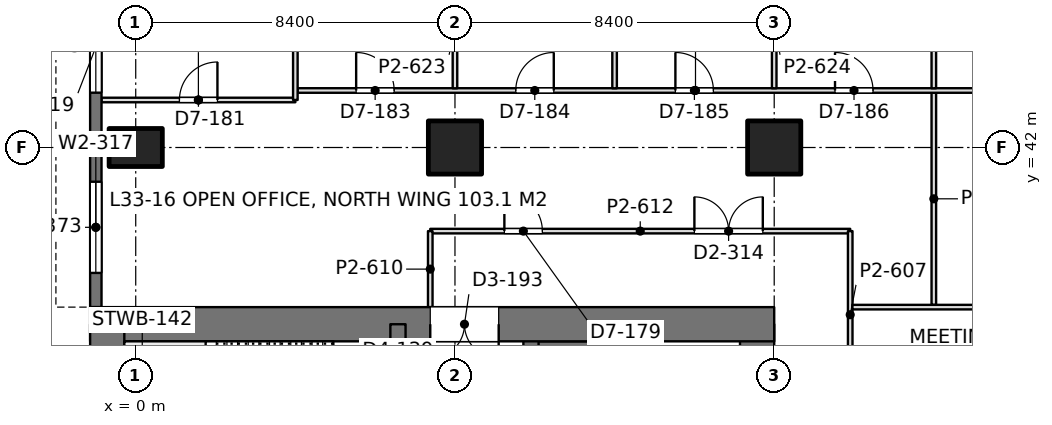
"""IFC4 building model, lengths in metres.
Left out: names, types, materials, properties, quantities, classifications, styles, units other than length and angle.
Written with IfcOpenShell. Run it as: python <this file> out.ifc"""

import sys

from ifc_helpers import new_model, si_unit, direction, frame, frame_2d, origin, origin_2d, place, context, subcontext, project, spatial, rectangle, extrude, element, fill, save


model = new_model("IFC4")
c1 = context("Model", 3, precision=1e-05, world=origin(), true_north=direction((0.0, 1.0)))
c2 = subcontext(c1, "Body", "Model", "MODEL_VIEW")
j1 = project(units=[si_unit("LENGTHUNIT", "METRE"), si_unit("PLANEANGLEUNIT", "RADIAN")], contexts=[c1])
p1 = place(None, origin())
s1 = spatial("IfcSite", under=j1, at=p1, CompositionType="ELEMENT")
p2 = place(p1, origin())
s2 = spatial("IfcBuilding", under=s1, at=p2, CompositionType="ELEMENT")
p3 = place(p2, frame((0.0, 0.0, 147.0)))
s3 = spatial("IfcBuildingStorey", under=s2, at=p3, CompositionType="ELEMENT", Elevation=147.0)
p4 = place(p3, frame((0.0, 42.0, 0.0), z_axis=(0.0, 0.0, 1.0), x_axis=(0.0, 1.0, 0.0)))
e1 = element("IfcColumn", 1, at=p4, inside=s3, PredefinedType="COLUMN", context=c2, shape_type="SweptSolid", body=[
    extrude(rectangle(XDim=1.0, YDim=1.4, at=origin_2d()), origin(), (0.0, 0.0, 1.0), 4.2),
])
for number, where, z_axis, x_axis in (
    (2, (8.4, 42.0, 0.0), (0.0, 0.0, 1.0), (1.0, 0.0, 0.0)),
    (3, (16.8, 42.0, 0.0), (0.0, 0.0, 1.0), (1.0, 0.0, 0.0)),
):
    element("IfcColumn", number, at=place(p3, frame(where, z_axis=z_axis, x_axis=x_axis)), inside=s3, PredefinedType="COLUMN", context=c2, shape_type="SweptSolid", body=[
        extrude(rectangle(XDim=1.4, YDim=1.4, at=origin_2d()), origin(), (0.0, 0.0, 1.0), 4.2),
    ])
p5 = place(p3, frame((-1.2, 37.35, 0.0), z_axis=(0.0, 0.0, 1.0), x_axis=(1.0, 0.0, 0.0)))
e4 = element("IfcWall", 4, at=p5, inside=s3, PredefinedType="SHEAR", context=c2, shape_type="SweptSolid", body=[
    extrude(rectangle(XDim=18.0, YDim=0.9, at=frame_2d((9.0, 0.0))), origin(), (0.0, 0.0, 1.0), 4.2),
])
p6 = place(p5, frame((8.95, 0.0, 0.0)))
e5 = element("IfcOpeningElement", 5, at=p6, cuts=e4, PredefinedType="OPENING", context=c2, shape_type="SweptSolid", body=[
    extrude(rectangle(XDim=1.8, YDim=2.4, at=frame_2d((0.9, 1.2))), frame((0.0, 0.46, 0.0), z_axis=(0.0, -1.0, 0.0), x_axis=(1.0, 0.0, 0.0)), (0.0, 0.0, 1.0), 0.92),
])
p7 = place(p3, frame((-0.75, 13.05, 0.0), z_axis=(0.0, 0.0, 1.0), x_axis=(0.0, 1.0, 0.0)))
e6 = element("IfcWall", 6, at=p7, inside=s3, PredefinedType="SHEAR", context=c2, shape_type="SweptSolid", body=[
    extrude(rectangle(XDim=24.3, YDim=0.9, at=frame_2d((12.15, 0.0))), origin(), (0.0, 0.0, 1.0), 4.2),
])
p8 = place(p3, frame((16.35, 22.1, 0.0), z_axis=(0.0, 0.0, 1.0), x_axis=(0.0, 1.0, 0.0)))
e7 = element("IfcWall", 7, at=p8, inside=s3, PredefinedType="SHEAR", context=c2, shape_type="SweptSolid", body=[
    extrude(rectangle(XDim=15.25, YDim=0.9, at=frame_2d((7.625, 0.0))), origin(), (0.0, 0.0, 1.0), 4.2),
])
p9 = place(p3, frame((6.9, 13.05, 0.0), z_axis=(0.0, 0.0, 1.0), x_axis=(0.0, 1.0, 0.0)))
e8 = element("IfcWall", 8, at=p9, inside=s3, PredefinedType="SHEAR", context=c2, shape_type="SweptSolid", body=[
    extrude(rectangle(XDim=24.3, YDim=0.4, at=frame_2d((12.15, 0.0))), origin(), (0.0, 0.0, 1.0), 4.2),
])
p10 = place(p9, frame((1.3, 0.0, 0.0)))
e9 = element("IfcOpeningElement", 9, at=p10, cuts=e8, PredefinedType="OPENING", context=c2, shape_type="SweptSolid", body=[
    extrude(rectangle(XDim=1.0, YDim=2.2, at=frame_2d((0.5, 1.1))), frame((0.0, 0.21, 0.0), z_axis=(0.0, -1.0, 0.0), x_axis=(1.0, 0.0, 0.0)), (0.0, 0.0, 1.0), 0.42),
])
p11 = place(p9, frame((22.0, 0.0, 0.0)))
e10 = element("IfcOpeningElement", 10, at=p11, cuts=e8, PredefinedType="OPENING", context=c2, shape_type="SweptSolid", body=[
    extrude(rectangle(XDim=1.0, YDim=2.2, at=frame_2d((0.5, 1.1))), frame((0.0, 0.21, 0.0), z_axis=(0.0, -1.0, 0.0), x_axis=(1.0, 0.0, 0.0)), (0.0, 0.0, 1.0), 0.42),
])
p12 = place(p9, frame((5.55, 0.0, 0.0)))
e11 = element("IfcOpeningElement", 11, at=p12, cuts=e8, PredefinedType="OPENING", context=c2, shape_type="SweptSolid", body=[
    extrude(rectangle(XDim=1.0, YDim=2.2, at=frame_2d((0.5, 1.1))), frame((0.0, 0.21, 0.0), z_axis=(0.0, -1.0, 0.0), x_axis=(1.0, 0.0, 0.0)), (0.0, 0.0, 1.0), 0.42),
])
p13 = place(p9, frame((9.55, 0.0, 0.0)))
e12 = element("IfcOpeningElement", 12, at=p13, cuts=e8, PredefinedType="OPENING", context=c2, shape_type="SweptSolid", body=[
    extrude(rectangle(XDim=1.0, YDim=2.2, at=frame_2d((0.5, 1.1))), frame((0.0, 0.21, 0.0), z_axis=(0.0, -1.0, 0.0), x_axis=(1.0, 0.0, 0.0)), (0.0, 0.0, 1.0), 0.42),
])
p14 = place(p9, frame((12.8, 0.0, 0.0)))
e13 = element("IfcOpeningElement", 13, at=p14, cuts=e8, PredefinedType="OPENING", context=c2, shape_type="SweptSolid", body=[
    extrude(rectangle(XDim=1.1, YDim=2.2, at=frame_2d((0.55, 1.1))), frame((0.0, 0.21, 0.0), z_axis=(0.0, -1.0, 0.0), x_axis=(1.0, 0.0, 0.0)), (0.0, 0.0, 1.0), 0.42),
])
p15 = place(p9, frame((15.538, 0.0, 0.0)))
e14 = element("IfcOpeningElement", 14, at=p15, cuts=e8, PredefinedType="OPENING", context=c2, shape_type="SweptSolid", body=[
    extrude(rectangle(XDim=1.1, YDim=2.2, at=frame_2d((0.55, 1.1))), frame((0.0, 0.21, 0.0), z_axis=(0.0, -1.0, 0.0), x_axis=(1.0, 0.0, 0.0)), (0.0, 0.0, 1.0), 0.42),
])
p16 = place(p9, frame((18.262, 0.0, 0.0)))
e15 = element("IfcOpeningElement", 15, at=p16, cuts=e8, PredefinedType="OPENING", context=c2, shape_type="SweptSolid", body=[
    extrude(rectangle(XDim=1.1, YDim=2.2, at=frame_2d((0.55, 1.1))), frame((0.0, 0.21, 0.0), z_axis=(0.0, -1.0, 0.0), x_axis=(1.0, 0.0, 0.0)), (0.0, 0.0, 1.0), 0.42),
])
p17 = place(p3, frame((10.4, 13.05, 0.0), z_axis=(0.0, 0.0, 1.0), x_axis=(0.0, 1.0, 0.0)))
e16 = element("IfcWall", 16, at=p17, inside=s3, PredefinedType="SHEAR", context=c2, shape_type="SweptSolid", body=[
    extrude(rectangle(XDim=24.3, YDim=0.4, at=frame_2d((12.15, 0.0))), origin(), (0.0, 0.0, 1.0), 4.2),
])
p18 = place(p17, frame((10.05, 0.0, 0.0)))
e17 = element("IfcOpeningElement", 17, at=p18, cuts=e16, PredefinedType="OPENING", context=c2, shape_type="SweptSolid", body=[
    extrude(rectangle(XDim=1.1, YDim=2.2, at=frame_2d((0.55, 1.1))), frame((0.0, 0.21, 0.0), z_axis=(0.0, -1.0, 0.0), x_axis=(1.0, 0.0, 0.0)), (0.0, 0.0, 1.0), 0.42),
])
p19 = place(p17, frame((12.9, 0.0, 0.0)))
e18 = element("IfcOpeningElement", 18, at=p19, cuts=e16, PredefinedType="OPENING", context=c2, shape_type="SweptSolid", body=[
    extrude(rectangle(XDim=1.1, YDim=2.2, at=frame_2d((0.55, 1.1))), frame((0.0, 0.21, 0.0), z_axis=(0.0, -1.0, 0.0), x_axis=(1.0, 0.0, 0.0)), (0.0, 0.0, 1.0), 0.42),
])
p20 = place(p17, frame((21.45, 0.0, 0.0)))
e19 = element("IfcOpeningElement", 19, at=p20, cuts=e16, PredefinedType="OPENING", context=c2, shape_type="SweptSolid", body=[
    extrude(rectangle(XDim=1.1, YDim=2.2, at=frame_2d((0.55, 1.1))), frame((0.0, 0.21, 0.0), z_axis=(0.0, -1.0, 0.0), x_axis=(1.0, 0.0, 0.0)), (0.0, 0.0, 1.0), 0.42),
])
p21 = place(p17, frame((2.25, 0.0, 0.0)))
e20 = element("IfcOpeningElement", 20, at=p21, cuts=e16, PredefinedType="OPENING", context=c2, shape_type="SweptSolid", body=[
    extrude(rectangle(XDim=1.8, YDim=2.4, at=frame_2d((0.9, 1.2))), frame((0.0, 0.21, 0.0), z_axis=(0.0, -1.0, 0.0), x_axis=(1.0, 0.0, 0.0)), (0.0, 0.0, 1.0), 0.42),
])
p22 = place(p17, frame((5.8, 0.0, 0.0)))
e21 = element("IfcOpeningElement", 21, at=p22, cuts=e16, PredefinedType="OPENING", context=c2, shape_type="SweptSolid", body=[
    extrude(rectangle(XDim=1.8, YDim=2.4, at=frame_2d((0.9, 1.2))), frame((0.0, 0.21, 0.0), z_axis=(0.0, -1.0, 0.0), x_axis=(1.0, 0.0, 0.0)), (0.0, 0.0, 1.0), 0.42),
])
p23 = place(p3, frame((13.6, 22.225, 0.0), z_axis=(0.0, 0.0, 1.0), x_axis=(0.0, 1.0, 0.0)))
e22 = element("IfcWall", 22, at=p23, inside=s3, PredefinedType="SHEAR", context=c2, shape_type="SweptSolid", body=[
    extrude(rectangle(XDim=15.125, YDim=0.4, at=frame_2d((7.562, 0.0))), origin(), (0.0, 0.0, 1.0), 4.2),
])
p24 = place(p3, frame((10.4, 36.625, 0.0), z_axis=(0.0, 0.0, 1.0), x_axis=(1.0, 0.0, 0.0)))
e23 = element("IfcWall", 23, at=p24, inside=s3, PredefinedType="SHEAR", context=c2, shape_type="SweptSolid", body=[
    extrude(rectangle(XDim=3.2, YDim=0.55, at=frame_2d((1.6, 0.0))), origin(), (0.0, 0.0, 1.0), 4.2),
])
p25 = place(p3, frame((-1.05, 37.8, 0.0), z_axis=(0.0, 0.0, 1.0), x_axis=(0.0, 1.0, 0.0)))
e24 = element("IfcWall", 24, at=p25, inside=s3, PredefinedType="SOLIDWALL", context=c2, shape_type="SweptSolid", body=[
    extrude(rectangle(XDim=4.2, YDim=0.3, at=frame_2d((2.1, 0.0))), origin(), (0.0, 0.0, 1.0), 4.05),
])
p26 = place(p25, frame((0.9, 0.0, 0.9)))
e25 = element("IfcOpeningElement", 25, at=p26, cuts=e24, PredefinedType="OPENING", context=c2, shape_type="SweptSolid", body=[
    extrude(rectangle(XDim=2.4, YDim=1.9, at=frame_2d((1.2, 0.95))), frame((0.0, 0.16, 0.0), z_axis=(0.0, -1.0, 0.0), x_axis=(1.0, 0.0, 0.0)), (0.0, 0.0, 1.0), 0.32),
])
p27 = place(p3, frame((-1.05, 42.0, 0.0), z_axis=(0.0, 0.0, 1.0), x_axis=(0.0, 1.0, 0.0)))
e26 = element("IfcWall", 26, at=p27, inside=s3, PredefinedType="SOLIDWALL", context=c2, shape_type="SweptSolid", body=[
    extrude(rectangle(XDim=5.285, YDim=0.3, at=frame_2d((2.643, 0.0))), origin(), (0.0, 0.0, 1.0), 4.05),
])
p28 = place(p27, frame((1.443, 0.0, 0.9)))
e27 = element("IfcOpeningElement", 27, at=p28, cuts=e26, PredefinedType="OPENING", context=c2, shape_type="SweptSolid", body=[
    extrude(rectangle(XDim=2.4, YDim=1.9, at=frame_2d((1.2, 0.95))), frame((0.0, 0.16, 0.0), z_axis=(0.0, -1.0, 0.0), x_axis=(1.0, 0.0, 0.0)), (0.0, 0.0, 1.0), 0.32),
])
p29 = place(p3, frame((-0.902, 43.25, 0.0), z_axis=(0.0, 0.0, 1.0), x_axis=(1.0, 0.0, 0.0)))
e28 = element("IfcWall", 28, at=p29, inside=s3, PredefinedType="PARTITIONING", context=c2, shape_type="SweptSolid", body=[
    extrude(rectangle(XDim=5.102, YDim=0.12, at=frame_2d((2.551, 0.0))), origin(), (0.0, 0.0, 1.0), 3.56),
])
p30 = place(p29, frame((2.052, 0.0, 0.0)))
e29 = element("IfcOpeningElement", 29, at=p30, cuts=e28, PredefinedType="OPENING", context=c2, shape_type="SweptSolid", body=[
    extrude(rectangle(XDim=1.0, YDim=2.4, at=frame_2d((0.5, 1.2))), frame((0.0, 0.07, 0.0), z_axis=(0.0, -1.0, 0.0), x_axis=(1.0, 0.0, 0.0)), (0.0, 0.0, 1.0), 0.14),
])
p31 = place(p3, frame((4.258, 43.5, 0.0), z_axis=(0.0, 0.0, 1.0), x_axis=(1.0, 0.0, 0.0)))
e30 = element("IfcWall", 30, at=p31, inside=s3, PredefinedType="PARTITIONING", context=c2, shape_type="SweptSolid", body=[
    extrude(rectangle(XDim=20.942, YDim=0.12, at=frame_2d((10.471, 0.0))), origin(), (0.0, 0.0, 1.0), 3.55),
])
p32 = place(p31, frame((1.542, 0.0, 0.0)))
e31 = element("IfcOpeningElement", 31, at=p32, cuts=e30, PredefinedType="OPENING", context=c2, shape_type="SweptSolid", body=[
    extrude(rectangle(XDim=1.0, YDim=2.4, at=frame_2d((0.5, 1.2))), frame((0.0, 0.07, 0.0), z_axis=(0.0, -1.0, 0.0), x_axis=(1.0, 0.0, 0.0)), (0.0, 0.0, 1.0), 0.14),
])
p33 = place(p31, frame((5.742, 0.0, 0.0)))
e32 = element("IfcOpeningElement", 32, at=p33, cuts=e30, PredefinedType="OPENING", context=c2, shape_type="SweptSolid", body=[
    extrude(rectangle(XDim=1.0, YDim=2.4, at=frame_2d((0.5, 1.2))), frame((0.0, 0.07, 0.0), z_axis=(0.0, -1.0, 0.0), x_axis=(1.0, 0.0, 0.0)), (0.0, 0.0, 1.0), 0.14),
])
p34 = place(p31, frame((9.942, 0.0, 0.0)))
e33 = element("IfcOpeningElement", 33, at=p34, cuts=e30, PredefinedType="OPENING", context=c2, shape_type="SweptSolid", body=[
    extrude(rectangle(XDim=1.0, YDim=2.4, at=frame_2d((0.5, 1.2))), frame((0.0, 0.07, 0.0), z_axis=(0.0, -1.0, 0.0), x_axis=(1.0, 0.0, 0.0)), (0.0, 0.0, 1.0), 0.14),
])
p35 = place(p31, frame((14.142, 0.0, 0.0)))
e34 = element("IfcOpeningElement", 34, at=p35, cuts=e30, PredefinedType="OPENING", context=c2, shape_type="SweptSolid", body=[
    extrude(rectangle(XDim=1.0, YDim=2.4, at=frame_2d((0.5, 1.2))), frame((0.0, 0.07, 0.0), z_axis=(0.0, -1.0, 0.0), x_axis=(1.0, 0.0, 0.0)), (0.0, 0.0, 1.0), 0.14),
])
p36 = place(p31, frame((18.342, 0.0, 0.0)))
e35 = element("IfcOpeningElement", 35, at=p36, cuts=e30, PredefinedType="OPENING", context=c2, shape_type="SweptSolid", body=[
    extrude(rectangle(XDim=1.0, YDim=2.4, at=frame_2d((0.5, 1.2))), frame((0.0, 0.07, 0.0), z_axis=(0.0, -1.0, 0.0), x_axis=(1.0, 0.0, 0.0)), (0.0, 0.0, 1.0), 0.14),
])
p37 = place(p3, frame((4.2, 43.25, 0.0), z_axis=(0.0, 0.0, 1.0), x_axis=(0.0, 1.0, 0.0)))
e36 = element("IfcWall", 36, at=p37, inside=s3, PredefinedType="PARTITIONING", context=c2, shape_type="SweptSolid", body=[
    extrude(rectangle(XDim=5.252, YDim=0.12, at=frame_2d((2.626, 0.0))), origin(), (0.0, 0.0, 1.0), 3.56),
])
p38 = place(p3, frame((8.4, 43.558, 0.0), z_axis=(0.0, 0.0, 1.0), x_axis=(0.0, 1.0, 0.0)))
e37 = element("IfcWall", 37, at=p38, inside=s3, PredefinedType="PARTITIONING", context=c2, shape_type="SweptSolid", body=[
    extrude(rectangle(XDim=3.343, YDim=0.12, at=frame_2d((1.671, 0.0))), origin(), (0.0, 0.0, 1.0), 3.55),
])
p39 = place(p3, frame((12.6, 43.558, 0.0), z_axis=(0.0, 0.0, 1.0), x_axis=(0.0, 1.0, 0.0)))
e38 = element("IfcWall", 38, at=p39, inside=s3, PredefinedType="PARTITIONING", context=c2, shape_type="SweptSolid", body=[
    extrude(rectangle(XDim=4.944, YDim=0.12, at=frame_2d((2.472, 0.0))), origin(), (0.0, 0.0, 1.0), 3.56),
])
p40 = place(p3, frame((16.8, 43.558, 0.0), z_axis=(0.0, 0.0, 1.0), x_axis=(0.0, 1.0, 0.0)))
e39 = element("IfcWall", 39, at=p40, inside=s3, PredefinedType="PARTITIONING", context=c2, shape_type="SweptSolid", body=[
    extrude(rectangle(XDim=3.343, YDim=0.12, at=frame_2d((1.671, 0.0))), origin(), (0.0, 0.0, 1.0), 3.55),
])
p41 = place(p3, frame((21.0, 43.558, 0.0), z_axis=(0.0, 0.0, 1.0), x_axis=(0.0, 1.0, 0.0)))
e40 = element("IfcWall", 40, at=p41, inside=s3, PredefinedType="PARTITIONING", context=c2, shape_type="SweptSolid", body=[
    extrude(rectangle(XDim=4.944, YDim=0.12, at=frame_2d((2.472, 0.0))), origin(), (0.0, 0.0, 1.0), 3.56),
])
p42 = place(p3, frame((21.0, 37.858, 0.0), z_axis=(0.0, 0.0, 1.0), x_axis=(0.0, 1.0, 0.0)))
e41 = element("IfcWall", 41, at=p42, inside=s3, PredefinedType="PARTITIONING", context=c2, shape_type="SweptSolid", body=[
    extrude(rectangle(XDim=5.584, YDim=0.12, at=frame_2d((2.792, 0.0))), origin(), (0.0, 0.0, 1.0), 3.55),
])
p43 = place(p3, frame((7.75, 39.8, 0.0), z_axis=(0.0, 0.0, 1.0), x_axis=(1.0, 0.0, 0.0)))
e42 = element("IfcWall", 42, at=p43, inside=s3, PredefinedType="PARTITIONING", context=c2, shape_type="SweptSolid", body=[
    extrude(rectangle(XDim=11.05, YDim=0.12, at=frame_2d((5.525, 0.0))), origin(), (0.0, 0.0, 1.0), 3.69),
])
p44 = place(p43, frame((1.95, 0.0, 0.0)))
e43 = element("IfcOpeningElement", 43, at=p44, cuts=e42, PredefinedType="OPENING", context=c2, shape_type="SweptSolid", body=[
    extrude(rectangle(XDim=1.0, YDim=2.4, at=frame_2d((0.5, 1.2))), frame((0.0, 0.07, 0.0), z_axis=(0.0, -1.0, 0.0), x_axis=(1.0, 0.0, 0.0)), (0.0, 0.0, 1.0), 0.14),
])
p45 = place(p43, frame((6.95, 0.0, 0.0)))
e44 = element("IfcOpeningElement", 44, at=p45, cuts=e42, PredefinedType="OPENING", context=c2, shape_type="SweptSolid", body=[
    extrude(rectangle(XDim=1.8, YDim=2.2, at=frame_2d((0.9, 1.1))), frame((0.0, 0.07, 0.0), z_axis=(0.0, -1.0, 0.0), x_axis=(1.0, 0.0, 0.0)), (0.0, 0.0, 1.0), 0.14),
])
p46 = place(p3, frame((7.75, 37.8, 0.0), z_axis=(0.0, 0.0, 1.0), x_axis=(0.0, 1.0, 0.0)))
e45 = element("IfcWall", 45, at=p46, inside=s3, PredefinedType="PARTITIONING", context=c2, shape_type="SweptSolid", body=[
    extrude(rectangle(XDim=2.0, YDim=0.12, at=frame_2d((1.0, 0.0))), origin(), (0.0, 0.0, 1.0), 4.05),
])
p47 = place(p3, frame((18.8, 35.4, 0.0), z_axis=(0.0, 0.0, 1.0), x_axis=(0.0, 1.0, 0.0)))
e46 = element("IfcWall", 46, at=p47, inside=s3, PredefinedType="PARTITIONING", context=c2, shape_type="SweptSolid", body=[
    extrude(rectangle(XDim=4.4, YDim=0.12, at=frame_2d((2.2, 0.0))), origin(), (0.0, 0.0, 1.0), 4.05),
])
p48 = place(p3, frame((18.858, 37.8, 0.0), z_axis=(0.0, 0.0, 1.0), x_axis=(1.0, 0.0, 0.0)))
e47 = element("IfcWall", 47, at=p48, inside=s3, PredefinedType="PARTITIONING", context=c2, shape_type="SweptSolid", body=[
    extrude(rectangle(XDim=12.684, YDim=0.12, at=frame_2d((6.342, 0.0))), origin(), (0.0, 0.0, 1.0), 3.55),
])
p49 = place(p26, origin())
e48 = element("IfcWindow", 48, at=p49, inside=s3, PartitioningType="SINGLE_PANEL", PredefinedType="WINDOW", context=c2, shape_type="SweptSolid", body=[
    extrude(rectangle(XDim=2.4, YDim=1.9, at=frame_2d((1.2, 0.95))), frame((0.0, 0.03, 0.0), z_axis=(0.0, -1.0, 0.0), x_axis=(1.0, 0.0, 0.0)), (0.0, 0.0, 1.0), 0.06),
])
fill(e25, e48)
p50 = place(p28, origin())
e49 = element("IfcWindow", 49, at=p50, inside=s3, PartitioningType="SINGLE_PANEL", PredefinedType="WINDOW", context=c2, shape_type="SweptSolid", body=[
    extrude(rectangle(XDim=2.4, YDim=1.9, at=frame_2d((1.2, 0.95))), frame((0.0, 0.03, 0.0), z_axis=(0.0, -1.0, 0.0), x_axis=(1.0, 0.0, 0.0)), (0.0, 0.0, 1.0), 0.06),
])
fill(e27, e49)
p51 = place(p6, frame((1.8, 0.0, 0.0), z_axis=(0.0, 0.0, 1.0), x_axis=(-1.0, 0.0, 0.0)))
e50 = element("IfcDoor", 50, at=p51, inside=s3, OperationType="DOUBLE_DOOR_SINGLE_SWING", PredefinedType="DOOR", context=c2, shape_type="SweptSolid", body=[
    extrude(rectangle(XDim=1.8, YDim=2.4, at=frame_2d((0.9, 1.2))), frame((0.0, 0.025, 0.0), z_axis=(0.0, -1.0, 0.0), x_axis=(1.0, 0.0, 0.0)), (0.0, 0.0, 1.0), 0.05),
])
fill(e5, e50)
p52 = place(p30, origin())
e51 = element("IfcDoor", 51, at=p52, inside=s3, OperationType="SINGLE_SWING_RIGHT", PredefinedType="DOOR", context=c2, shape_type="SweptSolid", body=[
    extrude(rectangle(XDim=1.0, YDim=2.4, at=frame_2d((0.5, 1.2))), frame((0.0, 0.025, 0.0), z_axis=(0.0, -1.0, 0.0), x_axis=(1.0, 0.0, 0.0)), (0.0, 0.0, 1.0), 0.05),
])
fill(e29, e51)
p53 = place(p32, origin())
e52 = element("IfcDoor", 52, at=p53, inside=s3, OperationType="SINGLE_SWING_LEFT", PredefinedType="DOOR", context=c2, shape_type="SweptSolid", body=[
    extrude(rectangle(XDim=1.0, YDim=2.4, at=frame_2d((0.5, 1.2))), frame((0.0, 0.025, 0.0), z_axis=(0.0, -1.0, 0.0), x_axis=(1.0, 0.0, 0.0)), (0.0, 0.0, 1.0), 0.05),
])
fill(e31, e52)
p54 = place(p33, origin())
e53 = element("IfcDoor", 53, at=p54, inside=s3, OperationType="SINGLE_SWING_RIGHT", PredefinedType="DOOR", context=c2, shape_type="SweptSolid", body=[
    extrude(rectangle(XDim=1.0, YDim=2.4, at=frame_2d((0.5, 1.2))), frame((0.0, 0.025, 0.0), z_axis=(0.0, -1.0, 0.0), x_axis=(1.0, 0.0, 0.0)), (0.0, 0.0, 1.0), 0.05),
])
fill(e32, e53)
p55 = place(p34, origin())
e54 = element("IfcDoor", 54, at=p55, inside=s3, OperationType="SINGLE_SWING_LEFT", PredefinedType="DOOR", context=c2, shape_type="SweptSolid", body=[
    extrude(rectangle(XDim=1.0, YDim=2.4, at=frame_2d((0.5, 1.2))), frame((0.0, 0.025, 0.0), z_axis=(0.0, -1.0, 0.0), x_axis=(1.0, 0.0, 0.0)), (0.0, 0.0, 1.0), 0.05),
])
fill(e33, e54)
p56 = place(p35, origin())
e55 = element("IfcDoor", 55, at=p56, inside=s3, OperationType="SINGLE_SWING_LEFT", PredefinedType="DOOR", context=c2, shape_type="SweptSolid", body=[
    extrude(rectangle(XDim=1.0, YDim=2.4, at=frame_2d((0.5, 1.2))), frame((0.0, 0.025, 0.0), z_axis=(0.0, -1.0, 0.0), x_axis=(1.0, 0.0, 0.0)), (0.0, 0.0, 1.0), 0.05),
])
fill(e34, e55)
p57 = place(p44, origin())
e56 = element("IfcDoor", 56, at=p57, inside=s3, OperationType="SINGLE_SWING_LEFT", PredefinedType="DOOR", context=c2, shape_type="SweptSolid", body=[
    extrude(rectangle(XDim=1.0, YDim=2.4, at=frame_2d((0.5, 1.2))), frame((0.0, 0.025, 0.0), z_axis=(0.0, -1.0, 0.0), x_axis=(1.0, 0.0, 0.0)), (0.0, 0.0, 1.0), 0.05),
])
fill(e43, e56)
p58 = place(p45, origin())
e57 = element("IfcDoor", 57, at=p58, inside=s3, OperationType="DOUBLE_DOOR_SINGLE_SWING", PredefinedType="DOOR", context=c2, shape_type="SweptSolid", body=[
    extrude(rectangle(XDim=1.8, YDim=2.2, at=frame_2d((0.9, 1.1))), frame((0.0, 0.025, 0.0), z_axis=(0.0, -1.0, 0.0), x_axis=(1.0, 0.0, 0.0)), (0.0, 0.0, 1.0), 0.05),
])
fill(e44, e57)
save(model, sys.argv[1])
